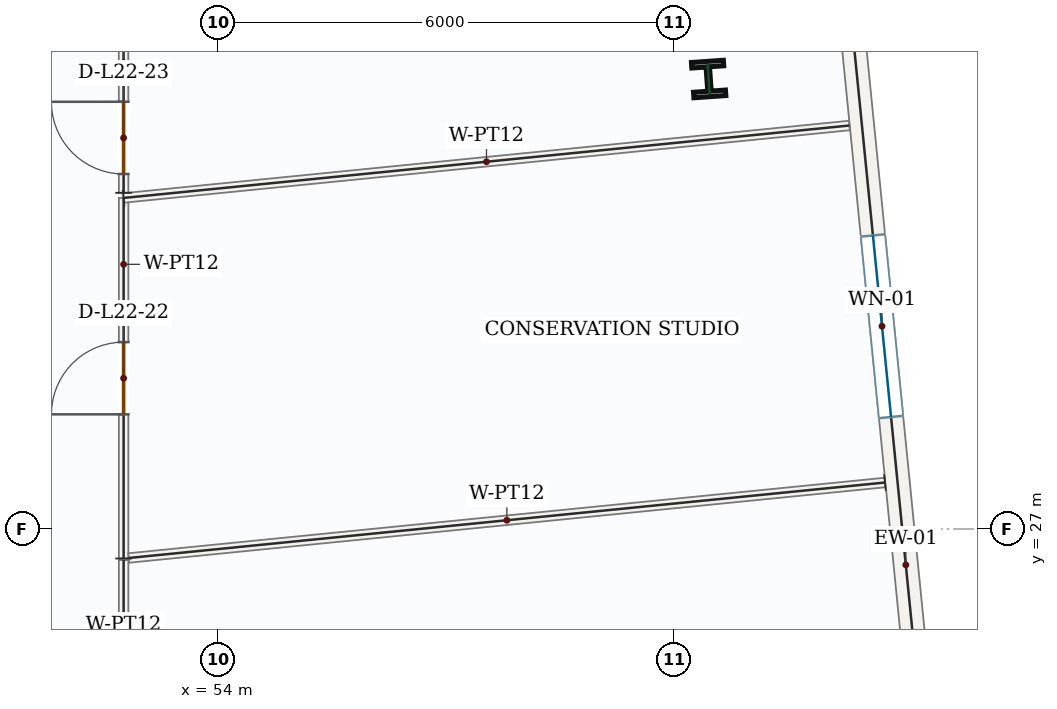
"""IFC4 building model, lengths in metres.
Left out: names, types, materials, properties, quantities, classifications, styles, units other than length and angle.
Written with IfcOpenShell. Run it as: python <this file> out.ifc"""

import sys

from ifc_helpers import new_model, si_unit, direction, frame, frame_2d, origin, origin_2d, place, context, subcontext, project, spatial, rectangle, i_section, extrude, source, transform, mapped, element, fill, save


model = new_model("IFC4")
c1 = context("Model", 3, precision=1e-05, world=origin(), true_north=direction((0.0, 1.0)))
c2 = subcontext(c1, "Body", "Model", "MODEL_VIEW")
j1 = project(units=[si_unit("LENGTHUNIT", "METRE"), si_unit("PLANEANGLEUNIT", "RADIAN")], contexts=[c1])
p1 = place(None, origin())
s1 = spatial("IfcSite", under=j1, at=p1, CompositionType="ELEMENT")
p2 = place(p1, origin())
s2 = spatial("IfcBuilding", under=s1, at=p2, CompositionType="ELEMENT")
p3 = place(p2, frame((0.0, 0.0, 100.5)))
s3 = spatial("IfcBuildingStorey", under=s2, at=p3, CompositionType="ELEMENT", Elevation=100.5)
m1 = source(origin(), c2, "Body", "SweptSolid", [
    extrude(i_section(OverallWidth=0.421, OverallDepth=0.465, WebThickness=0.045, FlangeThickness=0.073, FilletRadius=0.018, at=origin_2d()), origin(), (0.0, 0.0, 1.0), 4.2),
])
p4 = place(p3, frame((60.447, 32.92, 0.0), z_axis=(0.0, 0.0, 1.0), x_axis=(0.99756405026, 0.069756473744, 0.0)))
e1 = element("IfcColumn", 1, at=p4, inside=s3, PredefinedType="COLUMN", context=c2, shape_type="MappedRepresentation", body=[
    mapped(m1, transform((0.0, 0.0, 0.0), x_axis=(1.0, 0.0, 0.0), y_axis=(0.0, 1.0, 0.0), z_axis=(0.0, 0.0, 1.0), scale=1.0)),
])
p5 = place(p3, frame((62.235, 34.603, 0.0), z_axis=(0.0, 0.0, 1.0), x_axis=(0.099303907908, -0.995057151059, 0.0)))
e2 = element("IfcWall", 2, at=p5, inside=s3, PredefinedType="SOLIDWALL", context=c2, shape_type="SweptSolid", body=[
    extrude(rectangle(XDim=9.92, YDim=0.32, at=frame_2d((4.96, 0.0))), origin(), (0.0, 0.0, 1.0), 3.95),
])
p6 = place(p5, frame((3.76, 0.0, 0.85)))
e3 = element("IfcOpeningElement", 3, at=p6, cuts=e2, PredefinedType="OPENING", context=c2, shape_type="SweptSolid", body=[
    extrude(rectangle(XDim=2.4, YDim=1.8, at=frame_2d((1.2, 0.9))), frame((0.0, 0.17, 0.0), z_axis=(0.0, -1.0, 0.0), x_axis=(1.0, 0.0, 0.0)), (0.0, 0.0, 1.0), 0.34),
])
p7 = place(p3, frame((52.75, 26.612, 0.0), z_axis=(0.0, 0.0, 1.0), x_axis=(0.0, 1.0, 0.0)))
e4 = element("IfcWall", 4, at=p7, inside=s3, PredefinedType="PARTITIONING", context=c2, shape_type="SweptSolid", body=[
    extrude(rectangle(XDim=4.743, YDim=0.125, at=frame_2d((2.372, 0.0))), origin(), (0.0, 0.0, 1.0), 3.95),
])
p8 = place(p7, frame((1.897, 0.0, 0.0)))
e5 = element("IfcOpeningElement", 5, at=p8, cuts=e4, PredefinedType="OPENING", context=c2, shape_type="SweptSolid", body=[
    extrude(rectangle(XDim=0.95, YDim=2.15, at=frame_2d((0.475, 1.075))), frame((0.0, 0.073, 0.0), z_axis=(0.0, -1.0, 0.0), x_axis=(1.0, 0.0, 0.0)), (0.0, 0.0, 1.0), 0.145),
])
m2 = source(origin(), c2, "Body", "SweptSolid", [
    extrude(rectangle(XDim=9.595, YDim=0.125, at=frame_2d((4.798, 0.0))), origin(), (0.0, 0.0, 1.0), 3.95),
])
p9 = place(p3, frame((52.75, 31.355, 0.0), z_axis=(0.0, 0.0, 1.0), x_axis=(0.995054305912, 0.099332413068, 0.0)))
e6 = element("IfcWall", 6, at=p9, inside=s3, PredefinedType="PARTITIONING", context=c2, shape_type="MappedRepresentation", body=[
    mapped(m2, transform((0.0, 0.0, 0.0), x_axis=(1.0, 0.0, 0.0), y_axis=(0.0, 1.0, 0.0), z_axis=(0.0, 0.0, 1.0), scale=1.0)),
])
m3 = source(origin(), c2, "Body", "SweptSolid", [
    extrude(rectangle(XDim=9.999, YDim=0.125, at=frame_2d((5.0, 0.0))), origin(), (0.0, 0.0, 1.0), 3.95),
])
p10 = place(p3, frame((62.767, 27.612, 0.0), z_axis=(0.0, 0.0, 1.0), x_axis=(-0.995054581391, -0.099329653443, 0.0)))
e7 = element("IfcWall", 7, at=p10, inside=s3, PredefinedType="PARTITIONING", context=c2, shape_type="MappedRepresentation", body=[
    mapped(m3, transform((0.0, 0.0, 0.0), x_axis=(1.0, 0.0, 0.0), y_axis=(0.0, 1.0, 0.0), z_axis=(0.0, 0.0, 1.0), scale=1.0)),
])
p11 = place(p3, frame((52.75, 31.423, 0.0), z_axis=(0.0, 0.0, 1.0), x_axis=(-0.000470366834, 0.999999889378, 0.0)))
e8 = element("IfcWall", 8, at=p11, inside=s3, PredefinedType="PARTITIONING", context=c2, shape_type="SweptSolid", body=[
    extrude(rectangle(XDim=2.076, YDim=0.125, at=frame_2d((1.038, 0.0))), origin(), (0.0, 0.0, 1.0), 3.95),
])
p12 = place(p11, frame((0.248, 0.0, 0.0)))
e9 = element("IfcOpeningElement", 9, at=p12, cuts=e8, PredefinedType="OPENING", context=c2, shape_type="SweptSolid", body=[
    extrude(rectangle(XDim=0.95, YDim=2.15, at=frame_2d((0.475, 1.075))), frame((0.0, 0.073, 0.0), z_axis=(0.0, -1.0, 0.0), x_axis=(1.0, 0.0, 0.0)), (0.0, 0.0, 1.0), 0.145),
])
p13 = place(p3, frame((52.75, 20.568, 0.0), z_axis=(0.0, 0.0, 1.0), x_axis=(0.0, 1.0, 0.0)))
e10 = element("IfcWall", 10, at=p13, inside=s3, PredefinedType="PARTITIONING", context=c2, shape_type="SweptSolid", body=[
    extrude(rectangle(XDim=6.024, YDim=0.125, at=frame_2d((3.012, 0.0))), origin(), (0.0, 0.0, 1.0), 3.95),
])
p14 = place(p13, frame((2.537, 0.0, 0.0)))
e11 = element("IfcOpeningElement", 11, at=p14, cuts=e10, PredefinedType="OPENING", context=c2, shape_type="SweptSolid", body=[
    extrude(rectangle(XDim=0.95, YDim=2.15, at=frame_2d((0.475, 1.075))), frame((0.0, 0.073, 0.0), z_axis=(0.0, -1.0, 0.0), x_axis=(1.0, 0.0, 0.0)), (0.0, 0.0, 1.0), 0.145),
])
m4 = source(origin(), c2, "Body", "SweptSolid", [
    extrude(rectangle(XDim=2.4, YDim=1.8, at=frame_2d((1.2, 0.9))), frame((0.0, 0.03, 0.0), z_axis=(0.0, -1.0, 0.0), x_axis=(1.0, 0.0, 0.0)), (0.0, 0.0, 1.0), 0.06),
])
p15 = place(p6, origin())
e12 = element("IfcWindow", 12, at=p15, inside=s3, PartitioningType="DOUBLE_PANEL_VERTICAL", PredefinedType="WINDOW", context=c2, shape_type="MappedRepresentation", body=[
    mapped(m4, transform((0.0, 0.0, 0.0), x_axis=(1.0, 0.0, 0.0), y_axis=(0.0, 1.0, 0.0), z_axis=(0.0, 0.0, 1.0), scale=1.0)),
])
fill(e3, e12)
m5 = source(origin(), c2, "Body", "SweptSolid", [
    extrude(rectangle(XDim=0.95, YDim=2.15, at=frame_2d((0.475, 1.075))), frame((0.0, 0.025, 0.0), z_axis=(0.0, -1.0, 0.0), x_axis=(1.0, 0.0, 0.0)), (0.0, 0.0, 1.0), 0.05),
])
p16 = place(p8, origin())
e13 = element("IfcDoor", 13, at=p16, inside=s3, OperationType="SINGLE_SWING_LEFT", PredefinedType="DOOR", context=c2, shape_type="MappedRepresentation", body=[
    mapped(m5, transform((0.0, 0.0, 0.0), x_axis=(1.0, 0.0, 0.0), y_axis=(0.0, 1.0, 0.0), z_axis=(0.0, 0.0, 1.0), scale=1.0)),
])
fill(e5, e13)
p17 = place(p12, origin())
e14 = element("IfcDoor", 14, at=p17, inside=s3, OperationType="SINGLE_SWING_RIGHT", PredefinedType="DOOR", context=c2, shape_type="MappedRepresentation", body=[
    mapped(m5, transform((0.0, 0.0, 0.0), x_axis=(1.0, 0.0, 0.0), y_axis=(0.0, 1.0, 0.0), z_axis=(0.0, 0.0, 1.0), scale=1.0)),
])
fill(e9, e14)
save(model, sys.argv[1])
